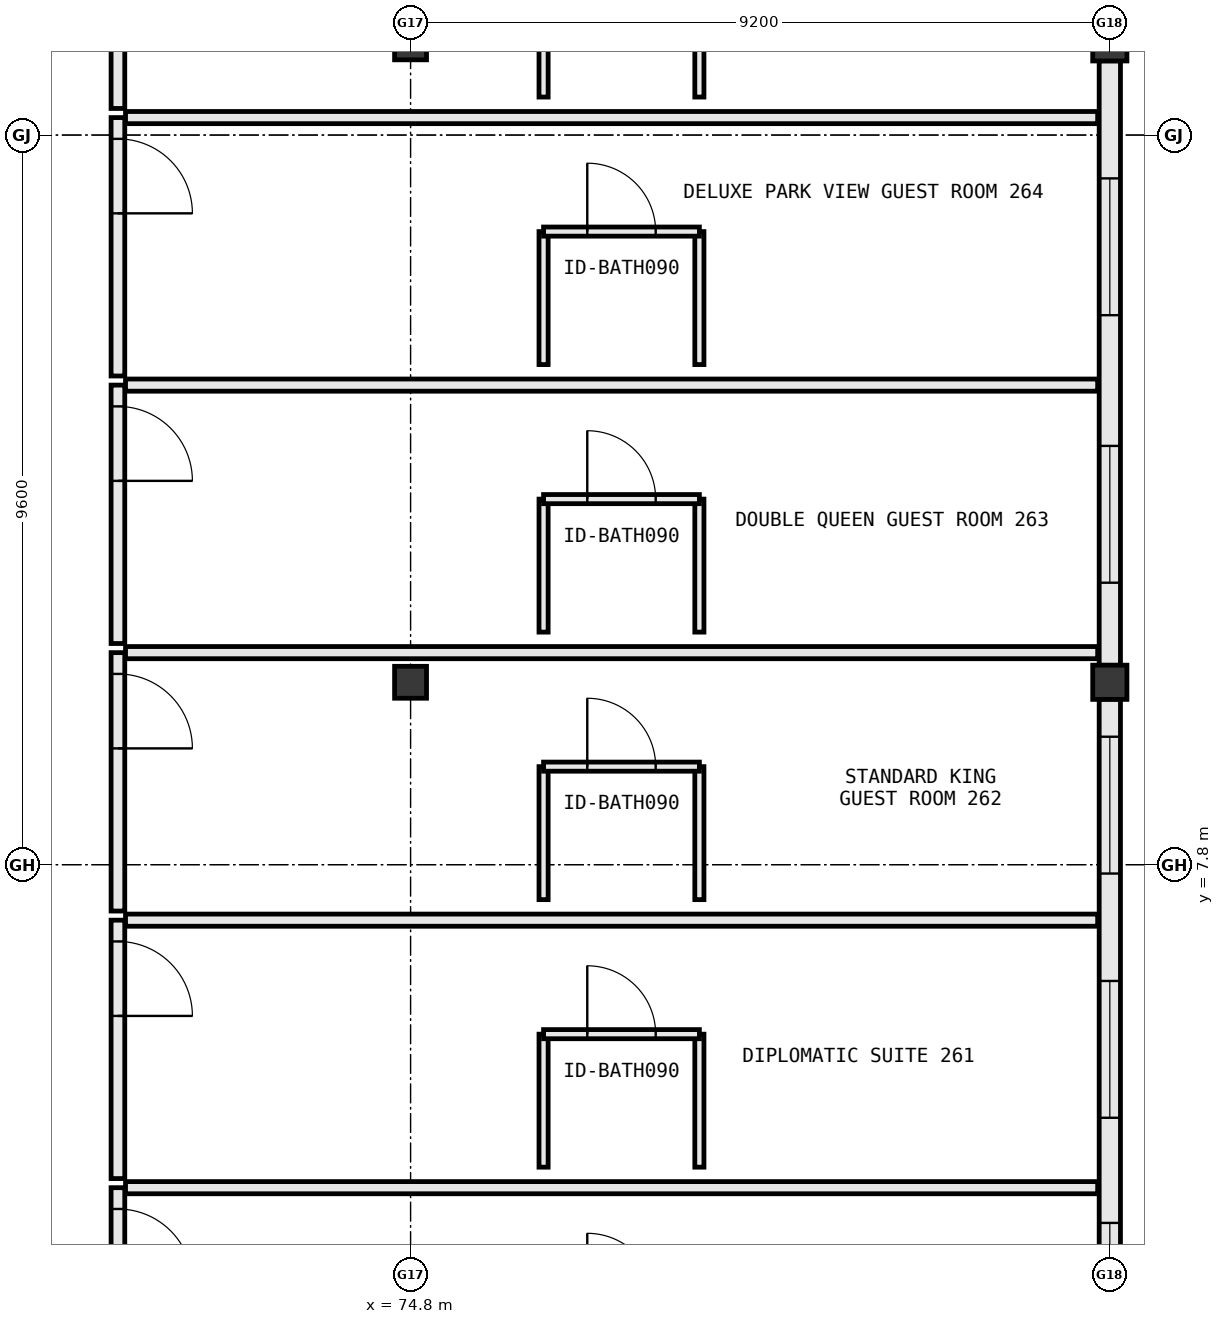
"""IFC4 building model, lengths in metres.
Left out: names, types, materials, properties, quantities, classifications, styles, units other than length and angle.
Written with IfcOpenShell. Run it as: python <this file> out.ifc"""

import sys

from ifc_helpers import new_model, si_unit, direction, frame, frame_2d, origin, origin_2d, place, context, subcontext, project, spatial, rectangle, extrude, element, fill, save


model = new_model("IFC4")
c1 = context("Model", 3, precision=1e-05, world=origin(), true_north=direction((0.0, 1.0)))
c2 = subcontext(c1, "Body", "Model", "MODEL_VIEW")
j1 = project(units=[si_unit("LENGTHUNIT", "METRE"), si_unit("PLANEANGLEUNIT", "RADIAN")], contexts=[c1])
p1 = place(None, origin())
s1 = spatial("IfcSite", under=j1, at=p1, CompositionType="ELEMENT")
p2 = place(p1, origin())
s2 = spatial("IfcBuilding", under=s1, at=p2, CompositionType="ELEMENT")
p3 = place(p2, frame((0.0, 0.0, 39.0)))
s3 = spatial("IfcBuildingStorey", under=s2, at=p3, CompositionType="ELEMENT", Elevation=39.0)
for number, where, z_axis, x_axis in (
    (1, (74.8, 10.2, 0.0), (0.0, 0.0, 1.0), (1.0, 0.0, 0.0)),
    (2, (74.8, 18.6, 0.0), (0.0, 0.0, 1.0), (1.0, 0.0, 0.0)),
):
    element("IfcColumn", number, at=place(p3, frame(where, z_axis=z_axis, x_axis=x_axis)), inside=s3, PredefinedType="COLUMN", context=c2, shape_type="SweptSolid", body=[
        extrude(rectangle(XDim=0.42, YDim=0.42, at=origin_2d()), origin(), (0.0, 0.0, 1.0), 3.8),
    ])
for number, where, z_axis, x_axis in (
    (3, (84.0, 10.2, 0.0), (0.0, 0.0, 1.0), (1.0, 0.0, 0.0)),
    (4, (84.0, 18.6, 0.0), (0.0, 0.0, 1.0), (1.0, 0.0, 0.0)),
):
    element("IfcColumn", number, at=place(p3, frame(where, z_axis=z_axis, x_axis=x_axis)), inside=s3, PredefinedType="COLUMN", context=c2, shape_type="SweptSolid", body=[
        extrude(rectangle(XDim=0.45, YDim=0.45, at=origin_2d()), origin(), (0.0, 0.0, 1.0), 3.8),
    ])
p4 = place(p3, frame((84.0, 0.823, 0.0), z_axis=(0.0, 0.0, 1.0), x_axis=(0.0, 1.0, 0.0)))
e5 = element("IfcWall", 5, at=p4, inside=s3, PredefinedType="STANDARD", context=c2, shape_type="SweptSolid", body=[
    extrude(rectangle(XDim=9.154, YDim=0.28, at=frame_2d((4.577, 0.0))), origin(), (0.0, 0.0, 1.0), 2.98),
])
p5 = place(p4, frame((0.463, 0.0, 0.85)))
e6 = element("IfcOpeningElement", 6, at=p5, cuts=e5, PredefinedType="OPENING", context=c2, shape_type="SweptSolid", body=[
    extrude(rectangle(XDim=1.8, YDim=1.85, at=frame_2d((0.9, 0.925))), frame((0.0, 0.152, 0.0), z_axis=(0.0, -1.0, 0.0), x_axis=(1.0, 0.0, 0.0)), (0.0, 0.0, 1.0), 0.304),
])
p6 = place(p4, frame((3.647, 0.0, 0.85)))
e7 = element("IfcOpeningElement", 7, at=p6, cuts=e5, PredefinedType="OPENING", context=c2, shape_type="SweptSolid", body=[
    extrude(rectangle(XDim=1.8, YDim=1.85, at=frame_2d((0.9, 0.925))), frame((0.0, 0.152, 0.0), z_axis=(0.0, -1.0, 0.0), x_axis=(1.0, 0.0, 0.0)), (0.0, 0.0, 1.0), 0.304),
])
p7 = place(p4, frame((6.861, 0.0, 0.85)))
e8 = element("IfcOpeningElement", 8, at=p7, cuts=e5, PredefinedType="OPENING", context=c2, shape_type="SweptSolid", body=[
    extrude(rectangle(XDim=1.8, YDim=1.85, at=frame_2d((0.9, 0.925))), frame((0.0, 0.152, 0.0), z_axis=(0.0, -1.0, 0.0), x_axis=(1.0, 0.0, 0.0)), (0.0, 0.0, 1.0), 0.304),
])
p8 = place(p3, frame((84.0, 10.423, 0.0), z_axis=(0.0, 0.0, 1.0), x_axis=(0.0, 1.0, 0.0)))
e9 = element("IfcWall", 9, at=p8, inside=s3, PredefinedType="STANDARD", context=c2, shape_type="SweptSolid", body=[
    extrude(rectangle(XDim=7.954, YDim=0.28, at=frame_2d((3.977, 0.0))), origin(), (0.0, 0.0, 1.0), 2.98),
])
p9 = place(p8, frame((1.087, 0.0, 0.85)))
e10 = element("IfcOpeningElement", 10, at=p9, cuts=e9, PredefinedType="OPENING", context=c2, shape_type="SweptSolid", body=[
    extrude(rectangle(XDim=1.8, YDim=1.85, at=frame_2d((0.9, 0.925))), frame((0.0, 0.152, 0.0), z_axis=(0.0, -1.0, 0.0), x_axis=(1.0, 0.0, 0.0)), (0.0, 0.0, 1.0), 0.304),
])
p10 = place(p8, frame((4.607, 0.0, 0.85)))
e11 = element("IfcOpeningElement", 11, at=p10, cuts=e9, PredefinedType="OPENING", context=c2, shape_type="SweptSolid", body=[
    extrude(rectangle(XDim=1.8, YDim=1.85, at=frame_2d((0.9, 0.925))), frame((0.0, 0.152, 0.0), z_axis=(0.0, -1.0, 0.0), x_axis=(1.0, 0.0, 0.0)), (0.0, 0.0, 1.0), 0.304),
])
p11 = place(p3, frame((70.95, 3.55, 0.0), z_axis=(0.0, 0.0, 1.0), x_axis=(0.0, -1.0, 0.0)))
e12 = element("IfcWall", 12, at=p11, inside=s3, PredefinedType="PARTITIONING", context=c2, shape_type="SweptSolid", body=[
    extrude(rectangle(XDim=3.4, YDim=0.18, at=frame_2d((1.7, 0.0))), origin(), (0.0, 0.0, 1.0), 3.565),
])
p12 = place(p11, frame((0.28, 0.0, 0.0)))
e13 = element("IfcOpeningElement", 13, at=p12, cuts=e12, PredefinedType="OPENING", context=c2, shape_type="SweptSolid", body=[
    extrude(rectangle(XDim=0.98, YDim=2.18, at=frame_2d((0.49, 1.09))), frame((0.0, 0.102, 0.0), z_axis=(0.0, -1.0, 0.0), x_axis=(1.0, 0.0, 0.0)), (0.0, 0.0, 1.0), 0.204),
])
p13 = place(p3, frame((71.05, 3.55, 0.0), z_axis=(0.0, 0.0, 1.0), x_axis=(1.0, 0.0, 0.0)))
e14 = element("IfcWall", 14, at=p13, inside=s3, PredefinedType="PARTITIONING", context=c2, shape_type="SweptSolid", body=[
    extrude(rectangle(XDim=12.79, YDim=0.16, at=frame_2d((6.395, 0.0))), origin(), (0.0, 0.0, 1.0), 3.565),
])
p14 = place(p3, frame((70.95, 7.07, 0.0), z_axis=(0.0, 0.0, 1.0), x_axis=(0.0, -1.0, 0.0)))
e15 = element("IfcWall", 15, at=p14, inside=s3, PredefinedType="PARTITIONING", context=c2, shape_type="SweptSolid", body=[
    extrude(rectangle(XDim=3.4, YDim=0.18, at=frame_2d((1.7, 0.0))), origin(), (0.0, 0.0, 1.0), 3.565),
])
p15 = place(p14, frame((0.28, 0.0, 0.0)))
e16 = element("IfcOpeningElement", 16, at=p15, cuts=e15, PredefinedType="OPENING", context=c2, shape_type="SweptSolid", body=[
    extrude(rectangle(XDim=0.98, YDim=2.18, at=frame_2d((0.49, 1.09))), frame((0.0, 0.102, 0.0), z_axis=(0.0, -1.0, 0.0), x_axis=(1.0, 0.0, 0.0)), (0.0, 0.0, 1.0), 0.204),
])
p16 = place(p3, frame((71.05, 7.07, 0.0), z_axis=(0.0, 0.0, 1.0), x_axis=(1.0, 0.0, 0.0)))
e17 = element("IfcWall", 17, at=p16, inside=s3, PredefinedType="PARTITIONING", context=c2, shape_type="SweptSolid", body=[
    extrude(rectangle(XDim=12.79, YDim=0.16, at=frame_2d((6.395, 0.0))), origin(), (0.0, 0.0, 1.0), 3.565),
])
for number, where, z_axis, x_axis in (
    (18, (76.55, 3.82, 0.0), (0.0, 0.0, 1.0), (0.0, 1.0, 0.0)),
    (19, (78.6, 3.82, 0.0), (0.0, 0.0, 1.0), (0.0, 1.0, 0.0)),
):
    element("IfcWall", number, at=place(p3, frame(where, z_axis=z_axis, x_axis=x_axis)), inside=s3, PredefinedType="PARTITIONING", context=c2, shape_type="SweptSolid", body=[
        extrude(rectangle(XDim=1.75, YDim=0.12, at=frame_2d((0.875, 0.0))), origin(), (0.0, 0.0, 1.0), 3.565),
    ])
p17 = place(p3, frame((76.55, 5.57, 0.0), z_axis=(0.0, 0.0, 1.0), x_axis=(1.0, 0.0, 0.0)))
e20 = element("IfcWall", 20, at=p17, inside=s3, PredefinedType="PARTITIONING", context=c2, shape_type="SweptSolid", body=[
    extrude(rectangle(XDim=2.05, YDim=0.12, at=frame_2d((1.025, 0.0))), origin(), (0.0, 0.0, 1.0), 3.565),
])
p18 = place(p17, frame((0.575, 0.0, 0.0)))
e21 = element("IfcOpeningElement", 21, at=p18, cuts=e20, PredefinedType="OPENING", context=c2, shape_type="SweptSolid", body=[
    extrude(rectangle(XDim=0.9, YDim=2.15, at=frame_2d((0.45, 1.075))), frame((0.0, 0.072, 0.0), z_axis=(0.0, -1.0, 0.0), x_axis=(1.0, 0.0, 0.0)), (0.0, 0.0, 1.0), 0.144),
])
p19 = place(p3, frame((70.95, 10.59, 0.0), z_axis=(0.0, 0.0, 1.0), x_axis=(0.0, -1.0, 0.0)))
e22 = element("IfcWall", 22, at=p19, inside=s3, PredefinedType="PARTITIONING", context=c2, shape_type="SweptSolid", body=[
    extrude(rectangle(XDim=3.4, YDim=0.18, at=frame_2d((1.7, 0.0))), origin(), (0.0, 0.0, 1.0), 3.565),
])
p20 = place(p19, frame((0.28, 0.0, 0.0)))
e23 = element("IfcOpeningElement", 23, at=p20, cuts=e22, PredefinedType="OPENING", context=c2, shape_type="SweptSolid", body=[
    extrude(rectangle(XDim=0.98, YDim=2.18, at=frame_2d((0.49, 1.09))), frame((0.0, 0.102, 0.0), z_axis=(0.0, -1.0, 0.0), x_axis=(1.0, 0.0, 0.0)), (0.0, 0.0, 1.0), 0.204),
])
p21 = place(p3, frame((71.05, 10.59, 0.0), z_axis=(0.0, 0.0, 1.0), x_axis=(1.0, 0.0, 0.0)))
e24 = element("IfcWall", 24, at=p21, inside=s3, PredefinedType="PARTITIONING", context=c2, shape_type="SweptSolid", body=[
    extrude(rectangle(XDim=12.79, YDim=0.16, at=frame_2d((6.395, 0.0))), origin(), (0.0, 0.0, 1.0), 2.94),
])
for number, where, z_axis, x_axis in (
    (25, (76.55, 7.34, 0.0), (0.0, 0.0, 1.0), (0.0, 1.0, 0.0)),
    (26, (78.6, 7.34, 0.0), (0.0, 0.0, 1.0), (0.0, 1.0, 0.0)),
):
    element("IfcWall", number, at=place(p3, frame(where, z_axis=z_axis, x_axis=x_axis)), inside=s3, PredefinedType="PARTITIONING", context=c2, shape_type="SweptSolid", body=[
        extrude(rectangle(XDim=1.75, YDim=0.12, at=frame_2d((0.875, 0.0))), origin(), (0.0, 0.0, 1.0), 3.565),
    ])
p22 = place(p3, frame((76.55, 9.09, 0.0), z_axis=(0.0, 0.0, 1.0), x_axis=(1.0, 0.0, 0.0)))
e27 = element("IfcWall", 27, at=p22, inside=s3, PredefinedType="PARTITIONING", context=c2, shape_type="SweptSolid", body=[
    extrude(rectangle(XDim=2.05, YDim=0.12, at=frame_2d((1.025, 0.0))), origin(), (0.0, 0.0, 1.0), 3.565),
])
p23 = place(p22, frame((0.575, 0.0, 0.0)))
e28 = element("IfcOpeningElement", 28, at=p23, cuts=e27, PredefinedType="OPENING", context=c2, shape_type="SweptSolid", body=[
    extrude(rectangle(XDim=0.9, YDim=2.15, at=frame_2d((0.45, 1.075))), frame((0.0, 0.072, 0.0), z_axis=(0.0, -1.0, 0.0), x_axis=(1.0, 0.0, 0.0)), (0.0, 0.0, 1.0), 0.144),
])
p24 = place(p3, frame((70.95, 14.11, 0.0), z_axis=(0.0, 0.0, 1.0), x_axis=(0.0, -1.0, 0.0)))
e29 = element("IfcWall", 29, at=p24, inside=s3, PredefinedType="PARTITIONING", context=c2, shape_type="SweptSolid", body=[
    extrude(rectangle(XDim=3.4, YDim=0.18, at=frame_2d((1.7, 0.0))), origin(), (0.0, 0.0, 1.0), 3.565),
])
p25 = place(p24, frame((0.28, 0.0, 0.0)))
e30 = element("IfcOpeningElement", 30, at=p25, cuts=e29, PredefinedType="OPENING", context=c2, shape_type="SweptSolid", body=[
    extrude(rectangle(XDim=0.98, YDim=2.18, at=frame_2d((0.49, 1.09))), frame((0.0, 0.102, 0.0), z_axis=(0.0, -1.0, 0.0), x_axis=(1.0, 0.0, 0.0)), (0.0, 0.0, 1.0), 0.204),
])
p26 = place(p3, frame((71.05, 14.11, 0.0), z_axis=(0.0, 0.0, 1.0), x_axis=(1.0, 0.0, 0.0)))
e31 = element("IfcWall", 31, at=p26, inside=s3, PredefinedType="PARTITIONING", context=c2, shape_type="SweptSolid", body=[
    extrude(rectangle(XDim=12.79, YDim=0.16, at=frame_2d((6.395, 0.0))), origin(), (0.0, 0.0, 1.0), 3.565),
])
for number, where, z_axis, x_axis in (
    (32, (76.55, 10.86, 0.0), (0.0, 0.0, 1.0), (0.0, 1.0, 0.0)),
    (33, (78.6, 10.86, 0.0), (0.0, 0.0, 1.0), (0.0, 1.0, 0.0)),
):
    element("IfcWall", number, at=place(p3, frame(where, z_axis=z_axis, x_axis=x_axis)), inside=s3, PredefinedType="PARTITIONING", context=c2, shape_type="SweptSolid", body=[
        extrude(rectangle(XDim=1.75, YDim=0.12, at=frame_2d((0.875, 0.0))), origin(), (0.0, 0.0, 1.0), 3.565),
    ])
p27 = place(p3, frame((76.55, 12.61, 0.0), z_axis=(0.0, 0.0, 1.0), x_axis=(1.0, 0.0, 0.0)))
e34 = element("IfcWall", 34, at=p27, inside=s3, PredefinedType="PARTITIONING", context=c2, shape_type="SweptSolid", body=[
    extrude(rectangle(XDim=2.05, YDim=0.12, at=frame_2d((1.025, 0.0))), origin(), (0.0, 0.0, 1.0), 3.565),
])
p28 = place(p27, frame((0.575, 0.0, 0.0)))
e35 = element("IfcOpeningElement", 35, at=p28, cuts=e34, PredefinedType="OPENING", context=c2, shape_type="SweptSolid", body=[
    extrude(rectangle(XDim=0.9, YDim=2.15, at=frame_2d((0.45, 1.075))), frame((0.0, 0.072, 0.0), z_axis=(0.0, -1.0, 0.0), x_axis=(1.0, 0.0, 0.0)), (0.0, 0.0, 1.0), 0.144),
])
p29 = place(p3, frame((70.95, 17.63, 0.0), z_axis=(0.0, 0.0, 1.0), x_axis=(0.0, -1.0, 0.0)))
e36 = element("IfcWall", 36, at=p29, inside=s3, PredefinedType="PARTITIONING", context=c2, shape_type="SweptSolid", body=[
    extrude(rectangle(XDim=3.4, YDim=0.18, at=frame_2d((1.7, 0.0))), origin(), (0.0, 0.0, 1.0), 3.565),
])
p30 = place(p29, frame((0.28, 0.0, 0.0)))
e37 = element("IfcOpeningElement", 37, at=p30, cuts=e36, PredefinedType="OPENING", context=c2, shape_type="SweptSolid", body=[
    extrude(rectangle(XDim=0.98, YDim=2.18, at=frame_2d((0.49, 1.09))), frame((0.0, 0.102, 0.0), z_axis=(0.0, -1.0, 0.0), x_axis=(1.0, 0.0, 0.0)), (0.0, 0.0, 1.0), 0.204),
])
p31 = place(p3, frame((71.05, 17.63, 0.0), z_axis=(0.0, 0.0, 1.0), x_axis=(1.0, 0.0, 0.0)))
e38 = element("IfcWall", 38, at=p31, inside=s3, PredefinedType="PARTITIONING", context=c2, shape_type="SweptSolid", body=[
    extrude(rectangle(XDim=12.79, YDim=0.16, at=frame_2d((6.395, 0.0))), origin(), (0.0, 0.0, 1.0), 3.565),
])
for number, where, z_axis, x_axis in (
    (39, (76.55, 14.38, 0.0), (0.0, 0.0, 1.0), (0.0, 1.0, 0.0)),
    (40, (78.6, 14.38, 0.0), (0.0, 0.0, 1.0), (0.0, 1.0, 0.0)),
):
    element("IfcWall", number, at=place(p3, frame(where, z_axis=z_axis, x_axis=x_axis)), inside=s3, PredefinedType="PARTITIONING", context=c2, shape_type="SweptSolid", body=[
        extrude(rectangle(XDim=1.75, YDim=0.12, at=frame_2d((0.875, 0.0))), origin(), (0.0, 0.0, 1.0), 3.565),
    ])
p32 = place(p3, frame((76.55, 16.13, 0.0), z_axis=(0.0, 0.0, 1.0), x_axis=(1.0, 0.0, 0.0)))
e41 = element("IfcWall", 41, at=p32, inside=s3, PredefinedType="PARTITIONING", context=c2, shape_type="SweptSolid", body=[
    extrude(rectangle(XDim=2.05, YDim=0.12, at=frame_2d((1.025, 0.0))), origin(), (0.0, 0.0, 1.0), 3.565),
])
p33 = place(p32, frame((0.575, 0.0, 0.0)))
e42 = element("IfcOpeningElement", 42, at=p33, cuts=e41, PredefinedType="OPENING", context=c2, shape_type="SweptSolid", body=[
    extrude(rectangle(XDim=0.9, YDim=2.15, at=frame_2d((0.45, 1.075))), frame((0.0, 0.072, 0.0), z_axis=(0.0, -1.0, 0.0), x_axis=(1.0, 0.0, 0.0)), (0.0, 0.0, 1.0), 0.144),
])
p34 = place(p3, frame((70.95, 21.15, 0.0), z_axis=(0.0, 0.0, 1.0), x_axis=(0.0, -1.0, 0.0)))
e43 = element("IfcWall", 43, at=p34, inside=s3, PredefinedType="PARTITIONING", context=c2, shape_type="SweptSolid", body=[
    extrude(rectangle(XDim=3.4, YDim=0.18, at=frame_2d((1.7, 0.0))), origin(), (0.0, 0.0, 1.0), 3.565),
])
p35 = place(p34, frame((0.28, 0.0, 0.0)))
e44 = element("IfcOpeningElement", 44, at=p35, cuts=e43, PredefinedType="OPENING", context=c2, shape_type="SweptSolid", body=[
    extrude(rectangle(XDim=0.98, YDim=2.18, at=frame_2d((0.49, 1.09))), frame((0.0, 0.102, 0.0), z_axis=(0.0, -1.0, 0.0), x_axis=(1.0, 0.0, 0.0)), (0.0, 0.0, 1.0), 0.204),
])
for number, where, z_axis, x_axis in (
    (45, (76.55, 17.9, 0.0), (0.0, 0.0, 1.0), (0.0, 1.0, 0.0)),
    (46, (78.6, 17.9, 0.0), (0.0, 0.0, 1.0), (0.0, 1.0, 0.0)),
):
    element("IfcWall", number, at=place(p3, frame(where, z_axis=z_axis, x_axis=x_axis)), inside=s3, PredefinedType="PARTITIONING", context=c2, shape_type="SweptSolid", body=[
        extrude(rectangle(XDim=1.75, YDim=0.12, at=frame_2d((0.875, 0.0))), origin(), (0.0, 0.0, 1.0), 3.565),
    ])
p36 = place(p5, origin())
e47 = element("IfcWindow", 47, at=p36, inside=s3, PartitioningType="SINGLE_PANEL", PredefinedType="WINDOW", context=c2, shape_type="SweptSolid", body=[
    extrude(rectangle(XDim=1.8, YDim=1.85, at=frame_2d((0.9, 0.925))), frame((0.0, 0.03, 0.0), z_axis=(0.0, -1.0, 0.0), x_axis=(1.0, 0.0, 0.0)), (0.0, 0.0, 1.0), 0.06),
])
fill(e6, e47)
p37 = place(p6, origin())
e48 = element("IfcWindow", 48, at=p37, inside=s3, PartitioningType="SINGLE_PANEL", PredefinedType="WINDOW", context=c2, shape_type="SweptSolid", body=[
    extrude(rectangle(XDim=1.8, YDim=1.85, at=frame_2d((0.9, 0.925))), frame((0.0, 0.03, 0.0), z_axis=(0.0, -1.0, 0.0), x_axis=(1.0, 0.0, 0.0)), (0.0, 0.0, 1.0), 0.06),
])
fill(e7, e48)
p38 = place(p7, origin())
e49 = element("IfcWindow", 49, at=p38, inside=s3, PartitioningType="SINGLE_PANEL", PredefinedType="WINDOW", context=c2, shape_type="SweptSolid", body=[
    extrude(rectangle(XDim=1.8, YDim=1.85, at=frame_2d((0.9, 0.925))), frame((0.0, 0.03, 0.0), z_axis=(0.0, -1.0, 0.0), x_axis=(1.0, 0.0, 0.0)), (0.0, 0.0, 1.0), 0.06),
])
fill(e8, e49)
p39 = place(p9, origin())
e50 = element("IfcWindow", 50, at=p39, inside=s3, PartitioningType="SINGLE_PANEL", PredefinedType="WINDOW", context=c2, shape_type="SweptSolid", body=[
    extrude(rectangle(XDim=1.8, YDim=1.85, at=frame_2d((0.9, 0.925))), frame((0.0, 0.03, 0.0), z_axis=(0.0, -1.0, 0.0), x_axis=(1.0, 0.0, 0.0)), (0.0, 0.0, 1.0), 0.06),
])
fill(e10, e50)
p40 = place(p10, origin())
e51 = element("IfcWindow", 51, at=p40, inside=s3, PartitioningType="SINGLE_PANEL", PredefinedType="WINDOW", context=c2, shape_type="SweptSolid", body=[
    extrude(rectangle(XDim=1.8, YDim=1.85, at=frame_2d((0.9, 0.925))), frame((0.0, 0.03, 0.0), z_axis=(0.0, -1.0, 0.0), x_axis=(1.0, 0.0, 0.0)), (0.0, 0.0, 1.0), 0.06),
])
fill(e11, e51)
p41 = place(p12, origin())
e52 = element("IfcDoor", 52, at=p41, inside=s3, OperationType="SINGLE_SWING_RIGHT", PredefinedType="DOOR", context=c2, shape_type="SweptSolid", body=[
    extrude(rectangle(XDim=0.98, YDim=2.18, at=frame_2d((0.49, 1.09))), frame((0.0, 0.025, 0.0), z_axis=(0.0, -1.0, 0.0), x_axis=(1.0, 0.0, 0.0)), (0.0, 0.0, 1.0), 0.05),
])
fill(e13, e52)
p42 = place(p15, origin())
e53 = element("IfcDoor", 53, at=p42, inside=s3, OperationType="SINGLE_SWING_RIGHT", PredefinedType="DOOR", context=c2, shape_type="SweptSolid", body=[
    extrude(rectangle(XDim=0.98, YDim=2.18, at=frame_2d((0.49, 1.09))), frame((0.0, 0.025, 0.0), z_axis=(0.0, -1.0, 0.0), x_axis=(1.0, 0.0, 0.0)), (0.0, 0.0, 1.0), 0.05),
])
fill(e16, e53)
p43 = place(p18, origin())
e54 = element("IfcDoor", 54, at=p43, inside=s3, OperationType="SINGLE_SWING_LEFT", PredefinedType="DOOR", context=c2, shape_type="SweptSolid", body=[
    extrude(rectangle(XDim=0.9, YDim=2.15, at=frame_2d((0.45, 1.075))), frame((0.0, 0.025, 0.0), z_axis=(0.0, -1.0, 0.0), x_axis=(1.0, 0.0, 0.0)), (0.0, 0.0, 1.0), 0.05),
])
fill(e21, e54)
p44 = place(p20, origin())
e55 = element("IfcDoor", 55, at=p44, inside=s3, OperationType="SINGLE_SWING_RIGHT", PredefinedType="DOOR", context=c2, shape_type="SweptSolid", body=[
    extrude(rectangle(XDim=0.98, YDim=2.18, at=frame_2d((0.49, 1.09))), frame((0.0, 0.025, 0.0), z_axis=(0.0, -1.0, 0.0), x_axis=(1.0, 0.0, 0.0)), (0.0, 0.0, 1.0), 0.05),
])
fill(e23, e55)
p45 = place(p23, origin())
e56 = element("IfcDoor", 56, at=p45, inside=s3, OperationType="SINGLE_SWING_LEFT", PredefinedType="DOOR", context=c2, shape_type="SweptSolid", body=[
    extrude(rectangle(XDim=0.9, YDim=2.15, at=frame_2d((0.45, 1.075))), frame((0.0, 0.025, 0.0), z_axis=(0.0, -1.0, 0.0), x_axis=(1.0, 0.0, 0.0)), (0.0, 0.0, 1.0), 0.05),
])
fill(e28, e56)
p46 = place(p25, origin())
e57 = element("IfcDoor", 57, at=p46, inside=s3, OperationType="SINGLE_SWING_RIGHT", PredefinedType="DOOR", context=c2, shape_type="SweptSolid", body=[
    extrude(rectangle(XDim=0.98, YDim=2.18, at=frame_2d((0.49, 1.09))), frame((0.0, 0.025, 0.0), z_axis=(0.0, -1.0, 0.0), x_axis=(1.0, 0.0, 0.0)), (0.0, 0.0, 1.0), 0.05),
])
fill(e30, e57)
p47 = place(p28, origin())
e58 = element("IfcDoor", 58, at=p47, inside=s3, OperationType="SINGLE_SWING_LEFT", PredefinedType="DOOR", context=c2, shape_type="SweptSolid", body=[
    extrude(rectangle(XDim=0.9, YDim=2.15, at=frame_2d((0.45, 1.075))), frame((0.0, 0.025, 0.0), z_axis=(0.0, -1.0, 0.0), x_axis=(1.0, 0.0, 0.0)), (0.0, 0.0, 1.0), 0.05),
])
fill(e35, e58)
p48 = place(p30, origin())
e59 = element("IfcDoor", 59, at=p48, inside=s3, OperationType="SINGLE_SWING_RIGHT", PredefinedType="DOOR", context=c2, shape_type="SweptSolid", body=[
    extrude(rectangle(XDim=0.98, YDim=2.18, at=frame_2d((0.49, 1.09))), frame((0.0, 0.025, 0.0), z_axis=(0.0, -1.0, 0.0), x_axis=(1.0, 0.0, 0.0)), (0.0, 0.0, 1.0), 0.05),
])
fill(e37, e59)
p49 = place(p33, origin())
e60 = element("IfcDoor", 60, at=p49, inside=s3, OperationType="SINGLE_SWING_LEFT", PredefinedType="DOOR", context=c2, shape_type="SweptSolid", body=[
    extrude(rectangle(XDim=0.9, YDim=2.15, at=frame_2d((0.45, 1.075))), frame((0.0, 0.025, 0.0), z_axis=(0.0, -1.0, 0.0), x_axis=(1.0, 0.0, 0.0)), (0.0, 0.0, 1.0), 0.05),
])
fill(e42, e60)
save(model, sys.argv[1])
